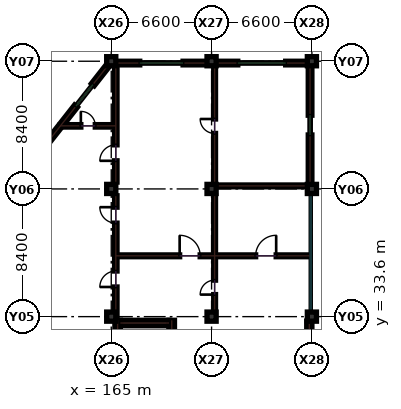
"""IFC4 building model, lengths in metres.
Left out: names, types, materials, properties, quantities, classifications, styles, units other than length and angle.
Written with IfcOpenShell. Run it as: python <this file> out.ifc"""

import sys

from ifc_helpers import new_model, si_unit, direction, frame, frame_2d, origin, origin_2d, place, context, subcontext, project, spatial, rectangle, extrude, element, fill, save


model = new_model("IFC4")
c1 = context("Model", 3, precision=1e-05, world=origin(), true_north=direction((0.0, 1.0)))
c2 = subcontext(c1, "Body", "Model", "MODEL_VIEW")
j1 = project(units=[si_unit("LENGTHUNIT", "METRE"), si_unit("PLANEANGLEUNIT", "RADIAN")], contexts=[c1])
p1 = place(None, origin())
s1 = spatial("IfcSite", under=j1, at=p1, CompositionType="ELEMENT")
p2 = place(p1, origin())
s2 = spatial("IfcBuilding", under=s1, at=p2, CompositionType="ELEMENT")
p3 = place(p2, frame((0.0, 0.0, 35.4)))
s3 = spatial("IfcBuildingStorey", under=s2, at=p3, CompositionType="ELEMENT", Elevation=35.4)
for number, where, z_axis, x_axis in (
    (1, (165.0, 33.6, 0.0), (0.0, 0.0, 1.0), (1.0, 0.0, 0.0)),
    (2, (165.0, 42.0, 0.0), (0.0, 0.0, 1.0), (1.0, 0.0, 0.0)),
    (3, (165.0, 50.4, 0.0), (0.0, 0.0, 1.0), (1.0, 0.0, 0.0)),
    (4, (171.6, 33.6, 0.0), (0.0, 0.0, 1.0), (1.0, 0.0, 0.0)),
    (5, (171.6, 42.0, 0.0), (0.0, 0.0, 1.0), (1.0, 0.0, 0.0)),
    (6, (171.6, 50.4, 0.0), (0.0, 0.0, 1.0), (1.0, 0.0, 0.0)),
    (7, (178.2, 33.6, 0.0), (0.0, 0.0, 1.0), (1.0, 0.0, 0.0)),
    (8, (178.2, 42.0, 0.0), (0.0, 0.0, 1.0), (1.0, 0.0, 0.0)),
    (9, (178.2, 50.4, 0.0), (0.0, 0.0, 1.0), (1.0, 0.0, 0.0)),
):
    element("IfcColumn", number, at=place(p3, frame(where, z_axis=z_axis, x_axis=x_axis)), inside=s3, PredefinedType="COLUMN", context=c2, shape_type="SweptSolid", body=[
        extrude(rectangle(XDim=0.6, YDim=0.6, at=origin_2d()), origin(), (0.0, 0.0, 1.0), 3.9),
    ])
p4 = place(p3, frame((165.3, 33.65, 0.0), z_axis=(0.0, 0.0, 1.0), x_axis=(0.0, 1.0, 0.0)))
e10 = element("IfcWall", 10, at=p4, inside=s3, PredefinedType="PARTITIONING", context=c2, shape_type="SweptSolid", body=[
    extrude(rectangle(XDim=7.9, YDim=0.16, at=frame_2d((3.95, 0.0))), origin(), (0.0, 0.0, 1.0), 2.93),
])
p5 = place(p4, frame((1.9, 0.0, 0.0)))
e11 = element("IfcOpeningElement", 11, at=p5, cuts=e10, PredefinedType="OPENING", context=c2, shape_type="SweptSolid", body=[
    extrude(rectangle(XDim=1.05, YDim=2.15, at=frame_2d((0.525, 1.075))), frame((0.0, 0.09, 0.0), z_axis=(0.0, -1.0, 0.0), x_axis=(1.0, 0.0, 0.0)), (0.0, 0.0, 1.0), 0.18),
])
p6 = place(p4, frame((6.1, 0.0, 0.0)))
e12 = element("IfcOpeningElement", 12, at=p6, cuts=e10, PredefinedType="OPENING", context=c2, shape_type="SweptSolid", body=[
    extrude(rectangle(XDim=1.05, YDim=2.15, at=frame_2d((0.525, 1.075))), frame((0.0, 0.09, 0.0), z_axis=(0.0, -1.0, 0.0), x_axis=(1.0, 0.0, 0.0)), (0.0, 0.0, 1.0), 0.18),
])
p7 = place(p3, frame((165.3, 42.45, 0.0), z_axis=(0.0, 0.0, 1.0), x_axis=(0.0, 1.0, 0.0)))
e13 = element("IfcWall", 13, at=p7, inside=s3, PredefinedType="PARTITIONING", context=c2, shape_type="SweptSolid", body=[
    extrude(rectangle(XDim=7.7, YDim=0.16, at=frame_2d((3.85, 0.0))), origin(), (0.0, 0.0, 1.0), 2.93),
])
p8 = place(p7, frame((1.4, 0.0, 0.0)))
e14 = element("IfcOpeningElement", 14, at=p8, cuts=e13, PredefinedType="OPENING", context=c2, shape_type="SweptSolid", body=[
    extrude(rectangle(XDim=1.05, YDim=2.15, at=frame_2d((0.525, 1.075))), frame((0.0, 0.09, 0.0), z_axis=(0.0, -1.0, 0.0), x_axis=(1.0, 0.0, 0.0)), (0.0, 0.0, 1.0), 0.18),
])
p9 = place(p3, frame((171.8, 33.65, 0.0), z_axis=(0.0, 0.0, 1.0), x_axis=(0.0, 1.0, 0.0)))
e15 = element("IfcWall", 15, at=p9, inside=s3, PredefinedType="PARTITIONING", context=c2, shape_type="SweptSolid", body=[
    extrude(rectangle(XDim=7.9, YDim=0.12, at=frame_2d((3.95, 0.0))), origin(), (0.0, 0.0, 1.0), 2.93),
])
p10 = place(p9, frame((1.4, 0.0, 0.0)))
e16 = element("IfcOpeningElement", 16, at=p10, cuts=e15, PredefinedType="OPENING", context=c2, shape_type="SweptSolid", body=[
    extrude(rectangle(XDim=0.95, YDim=2.15, at=frame_2d((0.475, 1.075))), frame((0.0, 0.07, 0.0), z_axis=(0.0, -1.0, 0.0), x_axis=(1.0, 0.0, 0.0)), (0.0, 0.0, 1.0), 0.14),
])
p11 = place(p3, frame((171.8, 42.45, 0.0), z_axis=(0.0, 0.0, 1.0), x_axis=(0.0, 1.0, 0.0)))
e17 = element("IfcWall", 17, at=p11, inside=s3, PredefinedType="PARTITIONING", context=c2, shape_type="SweptSolid", body=[
    extrude(rectangle(XDim=7.7, YDim=0.12, at=frame_2d((3.85, 0.0))), origin(), (0.0, 0.0, 1.0), 2.93),
])
p12 = place(p11, frame((3.2, 0.0, 0.0)))
e18 = element("IfcOpeningElement", 18, at=p12, cuts=e17, PredefinedType="OPENING", context=c2, shape_type="SweptSolid", body=[
    extrude(rectangle(XDim=0.95, YDim=2.15, at=frame_2d((0.475, 1.075))), frame((0.0, 0.07, 0.0), z_axis=(0.0, -1.0, 0.0), x_axis=(1.0, 0.0, 0.0)), (0.0, 0.0, 1.0), 0.14),
])
p13 = place(p3, frame((171.8, 42.2, 0.0), z_axis=(0.0, 0.0, 1.0), x_axis=(1.0, 0.0, 0.0)))
e19 = element("IfcWall", 19, at=p13, inside=s3, PredefinedType="PARTITIONING", context=c2, shape_type="SweptSolid", body=[
    extrude(rectangle(XDim=6.2, YDim=0.12, at=frame_2d((3.1, 0.0))), origin(), (0.0, 0.0, 1.0), 2.93),
])
p14 = place(p3, frame((165.3, 37.6, 0.0), z_axis=(0.0, 0.0, 1.0), x_axis=(1.0, 0.0, 0.0)))
e20 = element("IfcWall", 20, at=p14, inside=s3, PredefinedType="PARTITIONING", context=c2, shape_type="SweptSolid", body=[
    extrude(rectangle(XDim=12.75, YDim=0.12, at=frame_2d((6.375, 0.0))), origin(), (0.0, 0.0, 1.0), 2.93),
])
p15 = place(p14, frame((4.2, 0.0, 0.0)))
e21 = element("IfcOpeningElement", 21, at=p15, cuts=e20, PredefinedType="OPENING", context=c2, shape_type="SweptSolid", body=[
    extrude(rectangle(XDim=1.35, YDim=2.2, at=frame_2d((0.675, 1.1))), frame((0.0, 0.07, 0.0), z_axis=(0.0, -1.0, 0.0), x_axis=(1.0, 0.0, 0.0)), (0.0, 0.0, 1.0), 0.14),
])
p16 = place(p14, frame((9.2, 0.0, 0.0)))
e22 = element("IfcOpeningElement", 22, at=p16, cuts=e20, PredefinedType="OPENING", context=c2, shape_type="SweptSolid", body=[
    extrude(rectangle(XDim=1.35, YDim=2.2, at=frame_2d((0.675, 1.1))), frame((0.0, 0.07, 0.0), z_axis=(0.0, -1.0, 0.0), x_axis=(1.0, 0.0, 0.0)), (0.0, 0.0, 1.0), 0.14),
])
p17 = place(p3, frame((161.65, 46.15, 0.0), z_axis=(0.0, 0.0, 1.0), x_axis=(1.0, 0.0, 0.0)))
e23 = element("IfcWall", 23, at=p17, inside=s3, PredefinedType="PARTITIONING", context=c2, shape_type="SweptSolid", body=[
    extrude(rectangle(XDim=3.65, YDim=0.16, at=frame_2d((1.825, 0.0))), origin(), (0.0, 0.0, 1.0), 2.93),
])
p18 = place(p17, frame((1.35, 0.0, 0.0)))
e24 = element("IfcOpeningElement", 24, at=p18, cuts=e23, PredefinedType="OPENING", context=c2, shape_type="SweptSolid", body=[
    extrude(rectangle(XDim=0.95, YDim=2.15, at=frame_2d((0.475, 1.075))), frame((0.0, 0.09, 0.0), z_axis=(0.0, -1.0, 0.0), x_axis=(1.0, 0.0, 0.0)), (0.0, 0.0, 1.0), 0.18),
])
p19 = place(p3, frame((171.305, 50.28, 0.0), z_axis=(0.0, 0.0, 1.0), x_axis=(-1.0, 0.0, 0.0)))
e25 = element("IfcWall", 25, at=p19, inside=s3, PredefinedType="SOLIDWALL", context=c2, shape_type="SweptSolid", body=[
    extrude(rectangle(XDim=6.01, YDim=0.24, at=frame_2d((3.005, 0.0))), origin(), (0.0, 0.0, 1.0), 3.015),
])
p20 = place(p19, frame((1.58, 0.0, 0.95)))
e26 = element("IfcOpeningElement", 26, at=p20, cuts=e25, PredefinedType="OPENING", context=c2, shape_type="SweptSolid", body=[
    extrude(rectangle(XDim=2.85, YDim=1.65, at=frame_2d((1.425, 0.825))), frame((0.0, 0.13, 0.0), z_axis=(0.0, -1.0, 0.0), x_axis=(1.0, 0.0, 0.0)), (0.0, 0.0, 1.0), 0.26),
])
p21 = place(p3, frame((178.03, 25.495, 0.0), z_axis=(0.0, 0.0, 1.0), x_axis=(0.0, 1.0, 0.0)))
e27 = element("IfcWall", 27, at=p21, inside=s3, PredefinedType="SHEAR", context=c2, shape_type="SweptSolid", body=[
    extrude(rectangle(XDim=7.81, YDim=0.34, at=frame_2d((3.905, 0.0))), origin(), (0.0, 0.0, 1.0), 3.68),
])
p22 = place(p3, frame((178.08, 42.295, 0.0), z_axis=(0.0, 0.0, 1.0), x_axis=(0.0, 1.0, 0.0)))
e28 = element("IfcWall", 28, at=p22, inside=s3, PredefinedType="SOLIDWALL", context=c2, shape_type="SweptSolid", body=[
    extrude(rectangle(XDim=7.81, YDim=0.24, at=frame_2d((3.905, 0.0))), origin(), (0.0, 0.0, 1.0), 3.065),
])
p23 = place(p22, frame((3.255, 0.0, 0.95)))
e29 = element("IfcOpeningElement", 29, at=p23, cuts=e28, PredefinedType="OPENING", context=c2, shape_type="SweptSolid", body=[
    extrude(rectangle(XDim=1.3, YDim=1.75, at=frame_2d((0.65, 0.875))), frame((0.0, 0.13, 0.0), z_axis=(0.0, -1.0, 0.0), x_axis=(1.0, 0.0, 0.0)), (0.0, 0.0, 1.0), 0.26),
])
p24 = place(p3, frame((177.905, 50.28, 0.0), z_axis=(0.0, 0.0, 1.0), x_axis=(-1.0, 0.0, 0.0)))
e30 = element("IfcWall", 30, at=p24, inside=s3, PredefinedType="SOLIDWALL", context=c2, shape_type="SweptSolid", body=[
    extrude(rectangle(XDim=6.01, YDim=0.24, at=frame_2d((3.005, 0.0))), origin(), (0.0, 0.0, 1.0), 3.015),
])
p25 = place(p24, frame((1.43, 0.0, 0.95)))
e31 = element("IfcOpeningElement", 31, at=p25, cuts=e30, PredefinedType="OPENING", context=c2, shape_type="SweptSolid", body=[
    extrude(rectangle(XDim=3.15, YDim=1.7, at=frame_2d((1.575, 0.85))), frame((0.0, 0.13, 0.0), z_axis=(0.0, -1.0, 0.0), x_axis=(1.0, 0.0, 0.0)), (0.0, 0.0, 1.0), 0.26),
])
p26 = place(p3, frame((158.62, 42.28, 0.0), z_axis=(0.0, 0.0, 1.0), x_axis=(0.617811819191, 0.786325985878, 0.0)))
e32 = element("IfcWall", 32, at=p26, inside=s3, PredefinedType="SOLIDWALL", context=c2, shape_type="SweptSolid", body=[
    extrude(rectangle(XDim=9.97, YDim=0.24, at=frame_2d((4.985, 0.0))), origin(), (0.0, 0.0, 1.0), 3.065),
])
p27 = place(p26, frame((1.6, 0.0, 0.95)))
e33 = element("IfcOpeningElement", 33, at=p27, cuts=e32, PredefinedType="OPENING", context=c2, shape_type="SweptSolid", body=[
    extrude(rectangle(XDim=1.8, YDim=1.6, at=frame_2d((0.9, 0.8))), frame((0.0, 0.13, 0.0), z_axis=(0.0, -1.0, 0.0), x_axis=(1.0, 0.0, 0.0)), (0.0, 0.0, 1.0), 0.26),
])
p28 = place(p26, frame((6.57, 0.0, 0.95)))
e34 = element("IfcOpeningElement", 34, at=p28, cuts=e32, PredefinedType="OPENING", context=c2, shape_type="SweptSolid", body=[
    extrude(rectangle(XDim=1.8, YDim=1.6, at=frame_2d((0.9, 0.8))), frame((0.0, 0.13, 0.0), z_axis=(0.0, -1.0, 0.0), x_axis=(1.0, 0.0, 0.0)), (0.0, 0.0, 1.0), 0.26),
])
p29 = place(p3, frame((165.42, 25.19, 0.0), z_axis=(0.0, 0.0, 1.0), x_axis=(0.0, 1.0, 0.0)))
e35 = element("IfcWall", 35, at=p29, inside=s3, PredefinedType="SHEAR", context=c2, shape_type="SweptSolid", body=[
    extrude(rectangle(XDim=8.17, YDim=0.36, at=frame_2d((4.085, 0.0))), origin(), (0.0, 0.0, 1.0), 3.68),
])
p30 = place(p3, frame((168.98, 25.19, 0.0), z_axis=(0.0, 0.0, 1.0), x_axis=(0.0, 1.0, 0.0)))
e36 = element("IfcWall", 36, at=p30, inside=s3, PredefinedType="SHEAR", context=c2, shape_type="SweptSolid", body=[
    extrude(rectangle(XDim=8.17, YDim=0.36, at=frame_2d((4.085, 0.0))), origin(), (0.0, 0.0, 1.0), 3.68),
])
p31 = place(p30, frame((0.45, 0.0, 0.0)))
e37 = element("IfcOpeningElement", 37, at=p31, cuts=e36, PredefinedType="OPENING", context=c2, shape_type="SweptSolid", body=[
    extrude(rectangle(XDim=1.25, YDim=2.15, at=frame_2d((0.625, 1.075))), frame((0.0, 0.19, 0.0), z_axis=(0.0, -1.0, 0.0), x_axis=(1.0, 0.0, 0.0)), (0.0, 0.0, 1.0), 0.38),
])
p32 = place(p3, frame((165.6, 33.18, 0.0), z_axis=(0.0, 0.0, 1.0), x_axis=(1.0, 0.0, 0.0)))
e38 = element("IfcWall", 38, at=p32, inside=s3, PredefinedType="SHEAR", context=c2, shape_type="SweptSolid", body=[
    extrude(rectangle(XDim=3.2, YDim=0.36, at=frame_2d((1.6, 0.0))), origin(), (0.0, 0.0, 1.0), 3.68),
])
p33 = place(p5, origin())
e39 = element("IfcDoor", 39, at=p33, inside=s3, OperationType="SINGLE_SWING_LEFT", PredefinedType="DOOR", context=c2, shape_type="SweptSolid", body=[
    extrude(rectangle(XDim=1.05, YDim=2.15, at=frame_2d((0.525, 1.075))), frame((0.0, 0.025, 0.0), z_axis=(0.0, -1.0, 0.0), x_axis=(1.0, 0.0, 0.0)), (0.0, 0.0, 1.0), 0.05),
])
fill(e11, e39)
p34 = place(p6, origin())
e40 = element("IfcDoor", 40, at=p34, inside=s3, OperationType="SINGLE_SWING_RIGHT", PredefinedType="DOOR", context=c2, shape_type="SweptSolid", body=[
    extrude(rectangle(XDim=1.05, YDim=2.15, at=frame_2d((0.525, 1.075))), frame((0.0, 0.025, 0.0), z_axis=(0.0, -1.0, 0.0), x_axis=(1.0, 0.0, 0.0)), (0.0, 0.0, 1.0), 0.05),
])
fill(e12, e40)
p35 = place(p8, origin())
e41 = element("IfcDoor", 41, at=p35, inside=s3, OperationType="SINGLE_SWING_LEFT", PredefinedType="DOOR", context=c2, shape_type="SweptSolid", body=[
    extrude(rectangle(XDim=1.05, YDim=2.15, at=frame_2d((0.525, 1.075))), frame((0.0, 0.025, 0.0), z_axis=(0.0, -1.0, 0.0), x_axis=(1.0, 0.0, 0.0)), (0.0, 0.0, 1.0), 0.05),
])
fill(e14, e41)
p36 = place(p10, origin())
e42 = element("IfcDoor", 42, at=p36, inside=s3, OperationType="SINGLE_SWING_LEFT", PredefinedType="DOOR", context=c2, shape_type="SweptSolid", body=[
    extrude(rectangle(XDim=0.95, YDim=2.15, at=frame_2d((0.475, 1.075))), frame((0.0, 0.025, 0.0), z_axis=(0.0, -1.0, 0.0), x_axis=(1.0, 0.0, 0.0)), (0.0, 0.0, 1.0), 0.05),
])
fill(e16, e42)
p37 = place(p12, origin())
e43 = element("IfcDoor", 43, at=p37, inside=s3, OperationType="SINGLE_SWING_RIGHT", PredefinedType="DOOR", context=c2, shape_type="SweptSolid", body=[
    extrude(rectangle(XDim=0.95, YDim=2.15, at=frame_2d((0.475, 1.075))), frame((0.0, 0.025, 0.0), z_axis=(0.0, -1.0, 0.0), x_axis=(1.0, 0.0, 0.0)), (0.0, 0.0, 1.0), 0.05),
])
fill(e18, e43)
p38 = place(p15, origin())
e44 = element("IfcDoor", 44, at=p38, inside=s3, OperationType="SINGLE_SWING_LEFT", PredefinedType="DOOR", context=c2, shape_type="SweptSolid", body=[
    extrude(rectangle(XDim=1.35, YDim=2.2, at=frame_2d((0.675, 1.1))), frame((0.0, 0.025, 0.0), z_axis=(0.0, -1.0, 0.0), x_axis=(1.0, 0.0, 0.0)), (0.0, 0.0, 1.0), 0.05),
])
fill(e21, e44)
p39 = place(p16, origin())
e45 = element("IfcDoor", 45, at=p39, inside=s3, OperationType="SINGLE_SWING_RIGHT", PredefinedType="DOOR", context=c2, shape_type="SweptSolid", body=[
    extrude(rectangle(XDim=1.35, YDim=2.2, at=frame_2d((0.675, 1.1))), frame((0.0, 0.025, 0.0), z_axis=(0.0, -1.0, 0.0), x_axis=(1.0, 0.0, 0.0)), (0.0, 0.0, 1.0), 0.05),
])
fill(e22, e45)
p40 = place(p18, origin())
e46 = element("IfcDoor", 46, at=p40, inside=s3, OperationType="SINGLE_SWING_LEFT", PredefinedType="DOOR", context=c2, shape_type="SweptSolid", body=[
    extrude(rectangle(XDim=0.95, YDim=2.15, at=frame_2d((0.475, 1.075))), frame((0.0, 0.025, 0.0), z_axis=(0.0, -1.0, 0.0), x_axis=(1.0, 0.0, 0.0)), (0.0, 0.0, 1.0), 0.05),
])
fill(e24, e46)
p41 = place(p20, origin())
e47 = element("IfcWindow", 47, at=p41, inside=s3, PartitioningType="SINGLE_PANEL", PredefinedType="WINDOW", context=c2, shape_type="SweptSolid", body=[
    extrude(rectangle(XDim=2.85, YDim=1.65, at=frame_2d((1.425, 0.825))), frame((0.0, 0.03, 0.0), z_axis=(0.0, -1.0, 0.0), x_axis=(1.0, 0.0, 0.0)), (0.0, 0.0, 1.0), 0.06),
])
fill(e26, e47)
p42 = place(p23, origin())
e48 = element("IfcWindow", 48, at=p42, inside=s3, PartitioningType="SINGLE_PANEL", PredefinedType="WINDOW", context=c2, shape_type="SweptSolid", body=[
    extrude(rectangle(XDim=1.3, YDim=1.75, at=frame_2d((0.65, 0.875))), frame((0.0, 0.03, 0.0), z_axis=(0.0, -1.0, 0.0), x_axis=(1.0, 0.0, 0.0)), (0.0, 0.0, 1.0), 0.06),
])
fill(e29, e48)
p43 = place(p25, origin())
e49 = element("IfcWindow", 49, at=p43, inside=s3, PartitioningType="SINGLE_PANEL", PredefinedType="WINDOW", context=c2, shape_type="SweptSolid", body=[
    extrude(rectangle(XDim=3.15, YDim=1.7, at=frame_2d((1.575, 0.85))), frame((0.0, 0.03, 0.0), z_axis=(0.0, -1.0, 0.0), x_axis=(1.0, 0.0, 0.0)), (0.0, 0.0, 1.0), 0.06),
])
fill(e31, e49)
p44 = place(p28, origin())
e50 = element("IfcWindow", 50, at=p44, inside=s3, PartitioningType="SINGLE_PANEL", PredefinedType="WINDOW", context=c2, shape_type="SweptSolid", body=[
    extrude(rectangle(XDim=1.8, YDim=1.6, at=frame_2d((0.9, 0.8))), frame((0.0, 0.03, 0.0), z_axis=(0.0, -1.0, 0.0), x_axis=(1.0, 0.0, 0.0)), (0.0, 0.0, 1.0), 0.06),
])
fill(e34, e50)
save(model, sys.argv[1])
